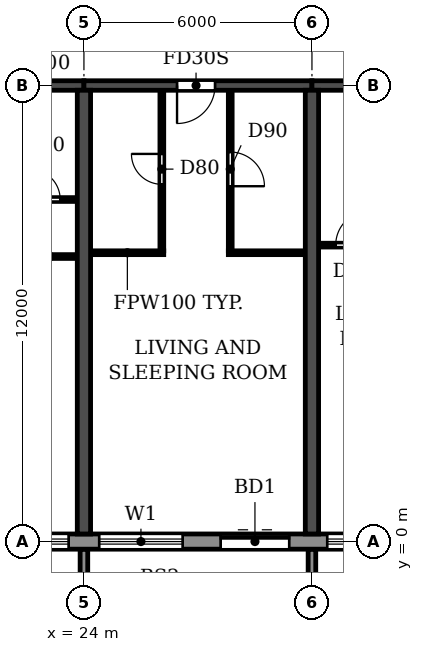
"""IFC4 building model, lengths in metres.
Left out: names, types, materials, properties, quantities, classifications, styles, units other than length and angle.
Written with IfcOpenShell. Run it as: python <this file> out.ifc"""

import sys

from ifc_helpers import new_model, si_unit, direction, frame, frame_2d, origin, place, context, subcontext, project, spatial, polyline, rectangle, outline, extrude, source, transform, mapped, element, fill, save


model = new_model("IFC4")
c1 = context("Model", 3, precision=1e-05, world=origin(), true_north=direction((0.0, 1.0)))
c2 = subcontext(c1, "Body", "Model", "MODEL_VIEW")
j1 = project(units=[si_unit("LENGTHUNIT", "METRE"), si_unit("PLANEANGLEUNIT", "RADIAN")], contexts=[c1])
p1 = place(None, origin())
s1 = spatial("IfcSite", under=j1, at=p1, CompositionType="ELEMENT")
p2 = place(p1, origin())
s2 = spatial("IfcBuilding", under=s1, at=p2, CompositionType="ELEMENT")
p3 = place(p2, frame((0.0, 0.0, 112.5)))
s3 = spatial("IfcBuildingStorey", under=s2, at=p3, CompositionType="ELEMENT", Elevation=112.5)
for number, where, z_axis, x_axis in (
    (1, (24.0, 0.2, 0.0), (0.0, 0.0, 1.0), (0.0, 1.0, 0.0)),
    (2, (30.0, 0.2, 0.0), (0.0, 0.0, 1.0), (0.0, 1.0, 0.0)),
):
    element("IfcWall", number, at=place(p3, frame(where, z_axis=z_axis, x_axis=x_axis)), inside=s3, PredefinedType="SHEAR", context=c2, shape_type="SweptSolid", body=[
        extrude(rectangle(XDim=11.675, YDim=0.35, at=frame_2d((5.837, 0.0))), origin(), (0.0, 0.0, 1.0), 2.95),
    ])
p4 = place(p3, frame((18.0, 12.0, 0.0), z_axis=(0.0, 0.0, 1.0), x_axis=(1.0, 0.0, 0.0)))
e3 = element("IfcWall", 3, at=p4, inside=s3, PredefinedType="SHEAR", context=c2, shape_type="SweptSolid", body=[
    extrude(rectangle(XDim=6.0, YDim=0.25, at=frame_2d((3.0, 0.0))), origin(), (0.0, 0.0, 1.0), 2.35),
])
p5 = place(p4, frame((2.55, 0.0, 0.0)))
e4 = element("IfcOpeningElement", 4, at=p5, cuts=e3, PredefinedType="OPENING", context=c2, shape_type="SweptSolid", body=[
    extrude(rectangle(XDim=1.0, YDim=2.1, at=frame_2d((0.5, 1.05))), frame((0.0, 0.135, 0.0), z_axis=(0.0, -1.0, 0.0), x_axis=(1.0, 0.0, 0.0)), (0.0, 0.0, 1.0), 0.27),
])
p6 = place(p3, frame((24.0, 12.0, 0.0), z_axis=(0.0, 0.0, 1.0), x_axis=(1.0, 0.0, 0.0)))
e5 = element("IfcWall", 5, at=p6, inside=s3, PredefinedType="SHEAR", context=c2, shape_type="SweptSolid", body=[
    extrude(rectangle(XDim=6.0, YDim=0.25, at=frame_2d((3.0, 0.0))), origin(), (0.0, 0.0, 1.0), 2.35),
])
p7 = place(p6, frame((2.45, 0.0, 0.0)))
e6 = element("IfcOpeningElement", 6, at=p7, cuts=e5, PredefinedType="OPENING", context=c2, shape_type="SweptSolid", body=[
    extrude(rectangle(XDim=1.0, YDim=2.1, at=frame_2d((0.5, 1.05))), frame((0.0, 0.135, 0.0), z_axis=(0.0, -1.0, 0.0), x_axis=(1.0, 0.0, 0.0)), (0.0, 0.0, 1.0), 0.27),
])
p8 = place(p3, frame((30.0, 12.0, 0.0), z_axis=(0.0, 0.0, 1.0), x_axis=(1.0, 0.0, 0.0)))
e7 = element("IfcWall", 7, at=p8, inside=s3, PredefinedType="SHEAR", context=c2, shape_type="SweptSolid", body=[
    extrude(rectangle(XDim=6.0, YDim=0.25, at=frame_2d((3.0, 0.0))), origin(), (0.0, 0.0, 1.0), 2.35),
])
p9 = place(p8, frame((2.55, 0.0, 0.0)))
e8 = element("IfcOpeningElement", 8, at=p9, cuts=e7, PredefinedType="OPENING", context=c2, shape_type="SweptSolid", body=[
    extrude(rectangle(XDim=1.0, YDim=2.1, at=frame_2d((0.5, 1.05))), frame((0.0, 0.135, 0.0), z_axis=(0.0, -1.0, 0.0), x_axis=(1.0, 0.0, 0.0)), (0.0, 0.0, 1.0), 0.27),
])
p10 = place(p3, frame((16.683, 0.0, 0.0), z_axis=(0.0, 0.0, 1.0), x_axis=(1.0, 0.0, 0.0)))
e9 = element("IfcWall", 9, at=p10, inside=s3, PredefinedType="STANDARD", context=c2, shape_type="SweptSolid", body=[
    extrude(rectangle(XDim=68.634, YDim=0.4, at=frame_2d((34.317, 0.0))), origin(), (0.0, 0.0, 1.0), 2.95),
])
p11 = place(p10, frame((1.717, 0.0, 0.9)))
e10 = element("IfcOpeningElement", 10, at=p11, cuts=e9, PredefinedType="OPENING", context=c2, shape_type="SweptSolid", body=[
    extrude(rectangle(XDim=2.2, YDim=1.5, at=frame_2d((1.1, 0.75))), frame((0.0, 0.21, 0.0), z_axis=(0.0, -1.0, 0.0), x_axis=(1.0, 0.0, 0.0)), (0.0, 0.0, 1.0), 0.42),
])
p12 = place(p10, frame((4.717, 0.0, 0.9)))
e11 = element("IfcOpeningElement", 11, at=p12, cuts=e9, PredefinedType="OPENING", context=c2, shape_type="SweptSolid", body=[
    extrude(rectangle(XDim=2.2, YDim=1.5, at=frame_2d((1.1, 0.75))), frame((0.0, 0.21, 0.0), z_axis=(0.0, -1.0, 0.0), x_axis=(1.0, 0.0, 0.0)), (0.0, 0.0, 1.0), 0.42),
])
p13 = place(p10, frame((7.717, 0.0, 0.9)))
e12 = element("IfcOpeningElement", 12, at=p13, cuts=e9, PredefinedType="OPENING", context=c2, shape_type="SweptSolid", body=[
    extrude(rectangle(XDim=2.2, YDim=1.5, at=frame_2d((1.1, 0.75))), frame((0.0, 0.21, 0.0), z_axis=(0.0, -1.0, 0.0), x_axis=(1.0, 0.0, 0.0)), (0.0, 0.0, 1.0), 0.42),
])
p14 = place(p10, frame((10.917, 0.0, 0.0)))
e13 = element("IfcOpeningElement", 13, at=p14, cuts=e9, PredefinedType="OPENING", context=c2, shape_type="SweptSolid", body=[
    extrude(rectangle(XDim=1.8, YDim=2.4, at=frame_2d((0.9, 1.2))), frame((0.0, 0.21, 0.0), z_axis=(0.0, -1.0, 0.0), x_axis=(1.0, 0.0, 0.0)), (0.0, 0.0, 1.0), 0.42),
])
p15 = place(p10, frame((13.717, 0.0, 0.9)))
e14 = element("IfcOpeningElement", 14, at=p15, cuts=e9, PredefinedType="OPENING", context=c2, shape_type="SweptSolid", body=[
    extrude(rectangle(XDim=2.2, YDim=1.5, at=frame_2d((1.1, 0.75))), frame((0.0, 0.21, 0.0), z_axis=(0.0, -1.0, 0.0), x_axis=(1.0, 0.0, 0.0)), (0.0, 0.0, 1.0), 0.42),
])
p16 = place(p10, frame((16.717, 0.0, 0.9)))
e15 = element("IfcOpeningElement", 15, at=p16, cuts=e9, PredefinedType="OPENING", context=c2, shape_type="SweptSolid", body=[
    extrude(rectangle(XDim=2.2, YDim=1.5, at=frame_2d((1.1, 0.75))), frame((0.0, 0.21, 0.0), z_axis=(0.0, -1.0, 0.0), x_axis=(1.0, 0.0, 0.0)), (0.0, 0.0, 1.0), 0.42),
])
p17 = place(p10, frame((19.717, 0.0, 0.9)))
e16 = element("IfcOpeningElement", 16, at=p17, cuts=e9, PredefinedType="OPENING", context=c2, shape_type="SweptSolid", body=[
    extrude(rectangle(XDim=2.2, YDim=1.5, at=frame_2d((1.1, 0.75))), frame((0.0, 0.21, 0.0), z_axis=(0.0, -1.0, 0.0), x_axis=(1.0, 0.0, 0.0)), (0.0, 0.0, 1.0), 0.42),
])
p18 = place(p10, frame((22.717, 0.0, 0.9)))
e17 = element("IfcOpeningElement", 17, at=p18, cuts=e9, PredefinedType="OPENING", context=c2, shape_type="SweptSolid", body=[
    extrude(rectangle(XDim=2.2, YDim=1.5, at=frame_2d((1.1, 0.75))), frame((0.0, 0.21, 0.0), z_axis=(0.0, -1.0, 0.0), x_axis=(1.0, 0.0, 0.0)), (0.0, 0.0, 1.0), 0.42),
])
p19 = place(p10, frame((25.717, 0.0, 0.9)))
e18 = element("IfcOpeningElement", 18, at=p19, cuts=e9, PredefinedType="OPENING", context=c2, shape_type="SweptSolid", body=[
    extrude(rectangle(XDim=2.2, YDim=1.5, at=frame_2d((1.1, 0.75))), frame((0.0, 0.21, 0.0), z_axis=(0.0, -1.0, 0.0), x_axis=(1.0, 0.0, 0.0)), (0.0, 0.0, 1.0), 0.42),
])
p20 = place(p10, frame((28.717, 0.0, 0.9)))
e19 = element("IfcOpeningElement", 19, at=p20, cuts=e9, PredefinedType="OPENING", context=c2, shape_type="SweptSolid", body=[
    extrude(rectangle(XDim=2.2, YDim=1.5, at=frame_2d((1.1, 0.75))), frame((0.0, 0.21, 0.0), z_axis=(0.0, -1.0, 0.0), x_axis=(1.0, 0.0, 0.0)), (0.0, 0.0, 1.0), 0.42),
])
p21 = place(p10, frame((31.917, 0.0, 0.0)))
e20 = element("IfcOpeningElement", 20, at=p21, cuts=e9, PredefinedType="OPENING", context=c2, shape_type="SweptSolid", body=[
    extrude(rectangle(XDim=1.8, YDim=2.4, at=frame_2d((0.9, 1.2))), frame((0.0, 0.21, 0.0), z_axis=(0.0, -1.0, 0.0), x_axis=(1.0, 0.0, 0.0)), (0.0, 0.0, 1.0), 0.42),
])
p22 = place(p10, frame((34.717, 0.0, 0.9)))
e21 = element("IfcOpeningElement", 21, at=p22, cuts=e9, PredefinedType="OPENING", context=c2, shape_type="SweptSolid", body=[
    extrude(rectangle(XDim=2.2, YDim=1.5, at=frame_2d((1.1, 0.75))), frame((0.0, 0.21, 0.0), z_axis=(0.0, -1.0, 0.0), x_axis=(1.0, 0.0, 0.0)), (0.0, 0.0, 1.0), 0.42),
])
p23 = place(p10, frame((37.717, 0.0, 0.9)))
e22 = element("IfcOpeningElement", 22, at=p23, cuts=e9, PredefinedType="OPENING", context=c2, shape_type="SweptSolid", body=[
    extrude(rectangle(XDim=2.2, YDim=1.5, at=frame_2d((1.1, 0.75))), frame((0.0, 0.21, 0.0), z_axis=(0.0, -1.0, 0.0), x_axis=(1.0, 0.0, 0.0)), (0.0, 0.0, 1.0), 0.42),
])
p24 = place(p10, frame((40.717, 0.0, 0.9)))
e23 = element("IfcOpeningElement", 23, at=p24, cuts=e9, PredefinedType="OPENING", context=c2, shape_type="SweptSolid", body=[
    extrude(rectangle(XDim=2.2, YDim=1.5, at=frame_2d((1.1, 0.75))), frame((0.0, 0.21, 0.0), z_axis=(0.0, -1.0, 0.0), x_axis=(1.0, 0.0, 0.0)), (0.0, 0.0, 1.0), 0.42),
])
p25 = place(p10, frame((43.717, 0.0, 0.9)))
e24 = element("IfcOpeningElement", 24, at=p25, cuts=e9, PredefinedType="OPENING", context=c2, shape_type="SweptSolid", body=[
    extrude(rectangle(XDim=2.2, YDim=1.5, at=frame_2d((1.1, 0.75))), frame((0.0, 0.21, 0.0), z_axis=(0.0, -1.0, 0.0), x_axis=(1.0, 0.0, 0.0)), (0.0, 0.0, 1.0), 0.42),
])
p26 = place(p10, frame((46.917, 0.0, 0.0)))
e25 = element("IfcOpeningElement", 25, at=p26, cuts=e9, PredefinedType="OPENING", context=c2, shape_type="SweptSolid", body=[
    extrude(rectangle(XDim=1.8, YDim=2.4, at=frame_2d((0.9, 1.2))), frame((0.0, 0.21, 0.0), z_axis=(0.0, -1.0, 0.0), x_axis=(1.0, 0.0, 0.0)), (0.0, 0.0, 1.0), 0.42),
])
p27 = place(p10, frame((49.717, 0.0, 0.9)))
e26 = element("IfcOpeningElement", 26, at=p27, cuts=e9, PredefinedType="OPENING", context=c2, shape_type="SweptSolid", body=[
    extrude(rectangle(XDim=2.2, YDim=1.5, at=frame_2d((1.1, 0.75))), frame((0.0, 0.21, 0.0), z_axis=(0.0, -1.0, 0.0), x_axis=(1.0, 0.0, 0.0)), (0.0, 0.0, 1.0), 0.42),
])
p28 = place(p10, frame((52.717, 0.0, 0.9)))
e27 = element("IfcOpeningElement", 27, at=p28, cuts=e9, PredefinedType="OPENING", context=c2, shape_type="SweptSolid", body=[
    extrude(rectangle(XDim=2.2, YDim=1.5, at=frame_2d((1.1, 0.75))), frame((0.0, 0.21, 0.0), z_axis=(0.0, -1.0, 0.0), x_axis=(1.0, 0.0, 0.0)), (0.0, 0.0, 1.0), 0.42),
])
p29 = place(p10, frame((55.717, 0.0, 0.9)))
e28 = element("IfcOpeningElement", 28, at=p29, cuts=e9, PredefinedType="OPENING", context=c2, shape_type="SweptSolid", body=[
    extrude(rectangle(XDim=2.2, YDim=1.5, at=frame_2d((1.1, 0.75))), frame((0.0, 0.21, 0.0), z_axis=(0.0, -1.0, 0.0), x_axis=(1.0, 0.0, 0.0)), (0.0, 0.0, 1.0), 0.42),
])
p30 = place(p10, frame((58.717, 0.0, 0.9)))
e29 = element("IfcOpeningElement", 29, at=p30, cuts=e9, PredefinedType="OPENING", context=c2, shape_type="SweptSolid", body=[
    extrude(rectangle(XDim=2.2, YDim=1.5, at=frame_2d((1.1, 0.75))), frame((0.0, 0.21, 0.0), z_axis=(0.0, -1.0, 0.0), x_axis=(1.0, 0.0, 0.0)), (0.0, 0.0, 1.0), 0.42),
])
p31 = place(p10, frame((61.717, 0.0, 0.9)))
e30 = element("IfcOpeningElement", 30, at=p31, cuts=e9, PredefinedType="OPENING", context=c2, shape_type="SweptSolid", body=[
    extrude(rectangle(XDim=2.2, YDim=1.5, at=frame_2d((1.1, 0.75))), frame((0.0, 0.21, 0.0), z_axis=(0.0, -1.0, 0.0), x_axis=(1.0, 0.0, 0.0)), (0.0, 0.0, 1.0), 0.42),
])
p32 = place(p10, frame((64.717, 0.0, 0.9)))
e31 = element("IfcOpeningElement", 31, at=p32, cuts=e9, PredefinedType="OPENING", context=c2, shape_type="SweptSolid", body=[
    extrude(rectangle(XDim=2.2, YDim=1.5, at=frame_2d((1.1, 0.75))), frame((0.0, 0.21, 0.0), z_axis=(0.0, -1.0, 0.0), x_axis=(1.0, 0.0, 0.0)), (0.0, 0.0, 1.0), 0.42),
])
m1 = source(origin(), c2, "Body", "SweptSolid", [
    extrude(outline(polyline([(0.0, 0.0), (0.2, 0.0), (0.2, 1.65), (0.0, 1.65), (0.0, 0.0)])), origin(), (0.0, 0.0, 1.0), 3.1),
])
for number, where in (
    (32, (23.9, -1.85, 0.0)),
    (33, (29.9, -1.85, 0.0)),
):
    element("IfcWall", number, at=place(p3, frame(where)), inside=s3, PredefinedType="STANDARD", context=c2, shape_type="MappedRepresentation", body=[
        mapped(m1, transform((0.0, 0.0, 0.0))),
    ])
p33 = place(p3, frame((20.95, 7.5, 0.0), z_axis=(0.0, 0.0, 1.0), x_axis=(1.0, 0.0, 0.0)))
e34 = element("IfcWall", 34, at=p33, inside=s3, PredefinedType="PARTITIONING", context=c2, shape_type="SweptSolid", body=[
    extrude(rectangle(XDim=2.865, YDim=0.1, at=frame_2d((1.433, 0.0))), origin(), (0.0, 0.0, 1.0), 2.95),
])
p34 = place(p33, frame((0.55, 0.0, 0.0)))
e35 = element("IfcOpeningElement", 35, at=p34, cuts=e34, PredefinedType="OPENING", context=c2, shape_type="SweptSolid", body=[
    extrude(rectangle(XDim=0.9, YDim=2.1, at=frame_2d((0.45, 1.05))), frame((0.0, 0.06, 0.0), z_axis=(0.0, -1.0, 0.0), x_axis=(1.0, 0.0, 0.0)), (0.0, 0.0, 1.0), 0.12),
])
p35 = place(p3, frame((24.185, 7.6, 0.0), z_axis=(0.0, 0.0, 1.0), x_axis=(1.0, 0.0, 0.0)))
e36 = element("IfcWall", 36, at=p35, inside=s3, PredefinedType="PARTITIONING", context=c2, shape_type="SweptSolid", body=[
    extrude(rectangle(XDim=1.915, YDim=0.1, at=frame_2d((0.958, 0.0))), origin(), (0.0, 0.0, 1.0), 2.95),
])
p36 = place(p3, frame((27.8, 7.6, 0.0), z_axis=(0.0, 0.0, 1.0), x_axis=(1.0, 0.0, 0.0)))
e37 = element("IfcWall", 37, at=p36, inside=s3, PredefinedType="PARTITIONING", context=c2, shape_type="SweptSolid", body=[
    extrude(rectangle(XDim=2.015, YDim=0.1, at=frame_2d((1.007, 0.0))), origin(), (0.0, 0.0, 1.0), 2.95),
])
p37 = place(p3, frame((30.185, 7.8, 0.0), z_axis=(0.0, 0.0, 1.0), x_axis=(1.0, 0.0, 0.0)))
e38 = element("IfcWall", 38, at=p37, inside=s3, PredefinedType="PARTITIONING", context=c2, shape_type="SweptSolid", body=[
    extrude(rectangle(XDim=2.015, YDim=0.1, at=frame_2d((1.007, 0.0))), origin(), (0.0, 0.0, 1.0), 2.95),
])
p38 = place(p37, frame((0.44, 0.0, 0.0)))
e39 = element("IfcOpeningElement", 39, at=p38, cuts=e38, PredefinedType="OPENING", context=c2, shape_type="SweptSolid", body=[
    extrude(rectangle(XDim=0.9, YDim=2.1, at=frame_2d((0.45, 1.05))), frame((0.0, 0.06, 0.0), z_axis=(0.0, -1.0, 0.0), x_axis=(1.0, 0.0, 0.0)), (0.0, 0.0, 1.0), 0.12),
])
p39 = place(p3, frame((21.9, 9.0, 0.0), z_axis=(0.0, 0.0, 1.0), x_axis=(1.0, 0.0, 0.0)))
e40 = element("IfcWall", 40, at=p39, inside=s3, PredefinedType="PARTITIONING", context=c2, shape_type="SweptSolid", body=[
    extrude(rectangle(XDim=1.915, YDim=0.1, at=frame_2d((0.958, 0.0))), origin(), (0.0, 0.0, 1.0), 2.95),
])
p40 = place(p39, frame((0.675, 0.0, 0.0)))
e41 = element("IfcOpeningElement", 41, at=p40, cuts=e40, PredefinedType="OPENING", context=c2, shape_type="SweptSolid", body=[
    extrude(rectangle(XDim=0.8, YDim=2.1, at=frame_2d((0.4, 1.05))), frame((0.0, 0.06, 0.0), z_axis=(0.0, -1.0, 0.0), x_axis=(1.0, 0.0, 0.0)), (0.0, 0.0, 1.0), 0.12),
])
p41 = place(p3, frame((26.05, 7.65, 0.0), z_axis=(0.0, 0.0, 1.0), x_axis=(0.0, 1.0, 0.0)))
e42 = element("IfcWall", 42, at=p41, inside=s3, PredefinedType="PARTITIONING", context=c2, shape_type="SweptSolid", body=[
    extrude(rectangle(XDim=4.215, YDim=0.1, at=frame_2d((2.107, 0.0))), origin(), (0.0, 0.0, 1.0), 2.95),
])
p42 = place(p41, frame((1.75, 0.0, 0.0)))
e43 = element("IfcOpeningElement", 43, at=p42, cuts=e42, PredefinedType="OPENING", context=c2, shape_type="SweptSolid", body=[
    extrude(rectangle(XDim=0.8, YDim=2.1, at=frame_2d((0.4, 1.05))), frame((0.0, 0.06, 0.0), z_axis=(0.0, -1.0, 0.0), x_axis=(1.0, 0.0, 0.0)), (0.0, 0.0, 1.0), 0.12),
])
p43 = place(p3, frame((27.85, 7.65, 0.0), z_axis=(0.0, 0.0, 1.0), x_axis=(0.0, 1.0, 0.0)))
e44 = element("IfcWall", 44, at=p43, inside=s3, PredefinedType="PARTITIONING", context=c2, shape_type="SweptSolid", body=[
    extrude(rectangle(XDim=4.215, YDim=0.1, at=frame_2d((2.107, 0.0))), origin(), (0.0, 0.0, 1.0), 2.95),
])
p44 = place(p43, frame((1.7, 0.0, 0.0)))
e45 = element("IfcOpeningElement", 45, at=p44, cuts=e44, PredefinedType="OPENING", context=c2, shape_type="SweptSolid", body=[
    extrude(rectangle(XDim=0.9, YDim=2.1, at=frame_2d((0.45, 1.05))), frame((0.0, 0.06, 0.0), z_axis=(0.0, -1.0, 0.0), x_axis=(1.0, 0.0, 0.0)), (0.0, 0.0, 1.0), 0.12),
])
p45 = place(p12, origin())
e46 = element("IfcWindow", 46, at=p45, inside=s3, PartitioningType="DOUBLE_PANEL_HORIZONTAL", PredefinedType="WINDOW", context=c2, shape_type="SweptSolid", body=[
    extrude(rectangle(XDim=2.2, YDim=1.5, at=frame_2d((1.1, 0.75))), frame((0.0, 0.03, 0.0), z_axis=(0.0, -1.0, 0.0), x_axis=(1.0, 0.0, 0.0)), (0.0, 0.0, 1.0), 0.06),
])
fill(e11, e46)
p46 = place(p13, origin())
e47 = element("IfcWindow", 47, at=p46, inside=s3, PartitioningType="DOUBLE_PANEL_HORIZONTAL", PredefinedType="WINDOW", context=c2, shape_type="SweptSolid", body=[
    extrude(rectangle(XDim=2.2, YDim=1.5, at=frame_2d((1.1, 0.75))), frame((0.0, 0.03, 0.0), z_axis=(0.0, -1.0, 0.0), x_axis=(1.0, 0.0, 0.0)), (0.0, 0.0, 1.0), 0.06),
])
fill(e12, e47)
p47 = place(p14, origin())
e48 = element("IfcDoor", 48, at=p47, inside=s3, OperationType="DOUBLE_DOOR_SLIDING", PredefinedType="DOOR", context=c2, shape_type="SweptSolid", body=[
    extrude(rectangle(XDim=1.8, YDim=2.4, at=frame_2d((0.9, 1.2))), frame((0.0, 0.025, 0.0), z_axis=(0.0, -1.0, 0.0), x_axis=(1.0, 0.0, 0.0)), (0.0, 0.0, 1.0), 0.05),
])
fill(e13, e48)
p48 = place(p15, origin())
e49 = element("IfcWindow", 49, at=p48, inside=s3, PartitioningType="DOUBLE_PANEL_HORIZONTAL", PredefinedType="WINDOW", context=c2, shape_type="SweptSolid", body=[
    extrude(rectangle(XDim=2.2, YDim=1.5, at=frame_2d((1.1, 0.75))), frame((0.0, 0.03, 0.0), z_axis=(0.0, -1.0, 0.0), x_axis=(1.0, 0.0, 0.0)), (0.0, 0.0, 1.0), 0.06),
])
fill(e14, e49)
p49 = place(p40, origin())
e50 = element("IfcDoor", 50, at=p49, inside=s3, OperationType="SINGLE_SWING_LEFT", PredefinedType="DOOR", context=c2, shape_type="SweptSolid", body=[
    extrude(rectangle(XDim=0.8, YDim=2.1, at=frame_2d((0.4, 1.05))), frame((0.0, 0.025, 0.0), z_axis=(0.0, -1.0, 0.0), x_axis=(1.0, 0.0, 0.0)), (0.0, 0.0, 1.0), 0.05),
])
fill(e41, e50)
p50 = place(p42, origin())
e51 = element("IfcDoor", 51, at=p50, inside=s3, OperationType="SINGLE_SWING_RIGHT", PredefinedType="DOOR", context=c2, shape_type="SweptSolid", body=[
    extrude(rectangle(XDim=0.8, YDim=2.1, at=frame_2d((0.4, 1.05))), frame((0.0, 0.025, 0.0), z_axis=(0.0, -1.0, 0.0), x_axis=(1.0, 0.0, 0.0)), (0.0, 0.0, 1.0), 0.05),
])
fill(e43, e51)
p51 = place(p7, frame((1.0, 0.0, 0.0), z_axis=(0.0, 0.0, 1.0), x_axis=(-1.0, 0.0, 0.0)))
e52 = element("IfcDoor", 52, at=p51, inside=s3, OperationType="SINGLE_SWING_RIGHT", PredefinedType="DOOR", context=c2, shape_type="SweptSolid", body=[
    extrude(rectangle(XDim=1.0, YDim=2.1, at=frame_2d((0.5, 1.05))), frame((0.0, 0.025, 0.0), z_axis=(0.0, -1.0, 0.0), x_axis=(1.0, 0.0, 0.0)), (0.0, 0.0, 1.0), 0.05),
])
fill(e6, e52)
p52 = place(p44, frame((0.9, 0.0, 0.0), z_axis=(0.0, 0.0, 1.0), x_axis=(-1.0, 0.0, 0.0)))
e53 = element("IfcDoor", 53, at=p52, inside=s3, OperationType="SINGLE_SWING_RIGHT", PredefinedType="DOOR", context=c2, shape_type="SweptSolid", body=[
    extrude(rectangle(XDim=0.9, YDim=2.1, at=frame_2d((0.45, 1.05))), frame((0.0, 0.025, 0.0), z_axis=(0.0, -1.0, 0.0), x_axis=(1.0, 0.0, 0.0)), (0.0, 0.0, 1.0), 0.05),
])
fill(e45, e53)
p53 = place(p38, origin())
e54 = element("IfcDoor", 54, at=p53, inside=s3, OperationType="SINGLE_SWING_RIGHT", PredefinedType="DOOR", context=c2, shape_type="SweptSolid", body=[
    extrude(rectangle(XDim=0.9, YDim=2.1, at=frame_2d((0.45, 1.05))), frame((0.0, 0.025, 0.0), z_axis=(0.0, -1.0, 0.0), x_axis=(1.0, 0.0, 0.0)), (0.0, 0.0, 1.0), 0.05),
])
fill(e39, e54)
save(model, sys.argv[1])
